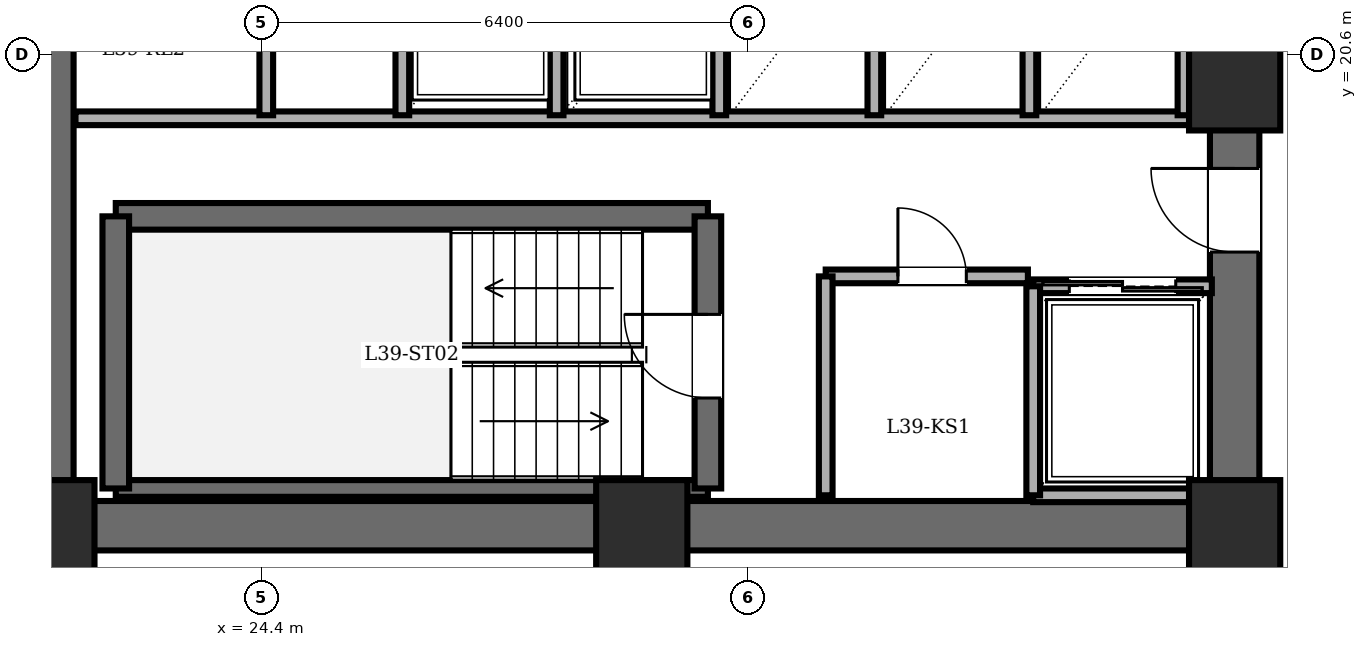
"""IFC4 building model, lengths in metres.
Left out: names, types, materials, properties, quantities, classifications, styles, units other than length and angle.
Written with IfcOpenShell. Run it as: python <this file> out.ifc"""

import sys

from ifc_helpers import new_model, si_unit, direction, frame, frame_2d, origin, origin_2d, place, context, subcontext, project, spatial, rectangle, extrude, element, fill, save


model = new_model("IFC4")
c1 = context("Model", 3, precision=1e-05, world=origin(), true_north=direction((0.0, 1.0)))
c2 = subcontext(c1, "Body", "Model", "MODEL_VIEW")
j1 = project(units=[si_unit("LENGTHUNIT", "METRE"), si_unit("PLANEANGLEUNIT", "RADIAN")], contexts=[c1])
p1 = place(None, origin())
s1 = spatial("IfcSite", under=j1, at=p1, CompositionType="ELEMENT")
p2 = place(p1, origin())
s2 = spatial("IfcBuilding", under=s1, at=p2, CompositionType="ELEMENT")
p3 = place(p2, frame((0.0, 0.0, 151.0)))
s3 = spatial("IfcBuildingStorey", under=s2, at=p3, CompositionType="ELEMENT", Elevation=151.0)
for number, where, z_axis, x_axis in (
    (1, (21.6, 14.4, 0.0), (0.0, 0.0, 1.0), (1.0, 0.0, 0.0)),
    (2, (29.4, 14.4, 0.0), (0.0, 0.0, 1.0), (1.0, 0.0, 0.0)),
    (3, (37.2, 14.4, 0.0), (0.0, 0.0, 1.0), (1.0, 0.0, 0.0)),
    (4, (37.2, 20.2, 0.0), (0.0, 0.0, 1.0), (1.0, 0.0, 0.0)),
):
    element("IfcColumn", number, at=place(p3, frame(where, z_axis=z_axis, x_axis=x_axis)), inside=s3, PredefinedType="COLUMN", context=c2, shape_type="SweptSolid", body=[
        extrude(rectangle(XDim=1.2, YDim=1.2, at=origin_2d()), origin(), (0.0, 0.0, 1.0), 3.6),
    ])
p4 = place(p3, frame((21.6, 14.4, 0.0), z_axis=(0.0, 0.0, 1.0), x_axis=(0.0, 1.0, 0.0)))
e5 = element("IfcWall", 5, at=p4, inside=s3, PredefinedType="SHEAR", context=c2, shape_type="SweptSolid", body=[
    extrude(rectangle(XDim=19.2, YDim=0.65, at=frame_2d((9.6, 0.0))), origin(), (0.0, 0.0, 1.0), 3.4),
])
p5 = place(p3, frame((37.2, 14.4, 0.0), z_axis=(0.0, 0.0, 1.0), x_axis=(-1.0, 0.0, 0.0)))
e6 = element("IfcWall", 6, at=p5, inside=s3, PredefinedType="SHEAR", context=c2, shape_type="SweptSolid", body=[
    extrude(rectangle(XDim=15.6, YDim=0.65, at=frame_2d((7.8, 0.0))), origin(), (0.0, 0.0, 1.0), 3.4),
])
p6 = place(p3, frame((37.2, 14.4, 0.0), z_axis=(0.0, 0.0, 1.0), x_axis=(0.0, 1.0, 0.0)))
e7 = element("IfcWall", 7, at=p6, inside=s3, PredefinedType="SHEAR", context=c2, shape_type="SweptSolid", body=[
    extrude(rectangle(XDim=19.2, YDim=0.65, at=frame_2d((9.6, 0.0))), origin(), (0.0, 0.0, 1.0), 3.4),
])
p7 = place(p6, frame((15.8, 0.0, 0.0)))
e8 = element("IfcOpeningElement", 8, at=p7, cuts=e7, PredefinedType="OPENING", context=c2, shape_type="SweptSolid", body=[
    extrude(rectangle(XDim=1.15, YDim=2.15, at=frame_2d((0.575, 1.075))), frame((0.0, 0.335, 0.0), z_axis=(0.0, -1.0, 0.0), x_axis=(1.0, 0.0, 0.0)), (0.0, 0.0, 1.0), 0.67),
])
p8 = place(p6, frame((3.6, 0.0, 0.0)))
e9 = element("IfcOpeningElement", 9, at=p8, cuts=e7, PredefinedType="OPENING", context=c2, shape_type="SweptSolid", body=[
    extrude(rectangle(XDim=1.1, YDim=2.15, at=frame_2d((0.55, 1.075))), frame((0.0, 0.335, 0.0), z_axis=(0.0, -1.0, 0.0), x_axis=(1.0, 0.0, 0.0)), (0.0, 0.0, 1.0), 0.67),
])
p9 = place(p6, frame((8.6, 0.0, 0.0)))
e10 = element("IfcOpeningElement", 10, at=p9, cuts=e7, PredefinedType="OPENING", context=c2, shape_type="SweptSolid", body=[
    extrude(rectangle(XDim=1.3, YDim=2.2, at=frame_2d((0.65, 1.1))), frame((0.0, 0.335, 0.0), z_axis=(0.0, -1.0, 0.0), x_axis=(1.0, 0.0, 0.0)), (0.0, 0.0, 1.0), 0.67),
])
p10 = place(p3, frame((22.48, 18.47, 0.0), z_axis=(0.0, 0.0, 1.0), x_axis=(1.0, 0.0, 0.0)))
e11 = element("IfcWall", 11, at=p10, inside=s3, PredefinedType="SOLIDWALL", context=c2, shape_type="SweptSolid", body=[
    extrude(rectangle(XDim=7.79, YDim=0.35, at=frame_2d((3.895, 0.0))), origin(), (0.0, 0.0, 1.0), 3.4),
])
p11 = place(p3, frame((22.48, 14.89, 0.0), z_axis=(0.0, 0.0, 1.0), x_axis=(1.0, 0.0, 0.0)))
e12 = element("IfcWall", 12, at=p11, inside=s3, PredefinedType="PARTITIONING", context=c2, shape_type="SweptSolid", body=[
    extrude(rectangle(XDim=7.79, YDim=0.22, at=frame_2d((3.895, 0.0))), origin(), (0.0, 0.0, 1.0), 3.4),
])
p12 = place(p3, frame((22.48, 14.89, 0.0), z_axis=(0.0, 0.0, 1.0), x_axis=(0.0, 1.0, 0.0)))
e13 = element("IfcWall", 13, at=p12, inside=s3, PredefinedType="SOLIDWALL", context=c2, shape_type="SweptSolid", body=[
    extrude(rectangle(XDim=3.58, YDim=0.35, at=frame_2d((1.79, 0.0))), origin(), (0.0, 0.0, 1.0), 3.4),
])
p13 = place(p3, frame((30.27, 14.89, 0.0), z_axis=(0.0, 0.0, 1.0), x_axis=(0.0, 1.0, 0.0)))
e14 = element("IfcWall", 14, at=p13, inside=s3, PredefinedType="SOLIDWALL", context=c2, shape_type="SweptSolid", body=[
    extrude(rectangle(XDim=3.58, YDim=0.35, at=frame_2d((1.79, 0.0))), origin(), (0.0, 0.0, 1.0), 3.4),
])
p14 = place(p13, frame((1.19, 0.0, 0.0)))
e15 = element("IfcOpeningElement", 15, at=p14, cuts=e14, PredefinedType="OPENING", context=c2, shape_type="SweptSolid", body=[
    extrude(rectangle(XDim=1.1, YDim=2.15, at=frame_2d((0.55, 1.075))), frame((0.0, 0.185, 0.0), z_axis=(0.0, -1.0, 0.0), x_axis=(1.0, 0.0, 0.0)), (0.0, 0.0, 1.0), 0.37),
])
p15 = place(p3, frame((21.95, 19.76, 0.0), z_axis=(0.0, 0.0, 1.0), x_axis=(1.0, 0.0, 0.0)))
e16 = element("IfcWall", 16, at=p15, inside=s3, PredefinedType="PARTITIONING", context=c2, shape_type="SweptSolid", body=[
    extrude(rectangle(XDim=14.87, YDim=0.18, at=frame_2d((7.435, 0.0))), origin(), (0.0, 0.0, 1.0), 3.4),
])
p16 = place(p3, frame((31.82, 17.68, 0.0), z_axis=(0.0, 0.0, 1.0), x_axis=(1.0, 0.0, 0.0)))
e17 = element("IfcWall", 17, at=p16, inside=s3, PredefinedType="PARTITIONING", context=c2, shape_type="SweptSolid", body=[
    extrude(rectangle(XDim=2.66, YDim=0.18, at=frame_2d((1.33, 0.0))), origin(), (0.0, 0.0, 1.0), 3.4),
])
p17 = place(p16, frame((0.95, 0.0, 0.0)))
e18 = element("IfcOpeningElement", 18, at=p17, cuts=e17, PredefinedType="OPENING", context=c2, shape_type="SweptSolid", body=[
    extrude(rectangle(XDim=0.9, YDim=2.05, at=frame_2d((0.45, 1.025))), frame((0.0, 0.1, 0.0), z_axis=(0.0, -1.0, 0.0), x_axis=(1.0, 0.0, 0.0)), (0.0, 0.0, 1.0), 0.2),
])
p18 = place(p3, frame((31.82, 14.8, 0.0), z_axis=(0.0, 0.0, 1.0), x_axis=(0.0, 1.0, 0.0)))
e19 = element("IfcWall", 19, at=p18, inside=s3, PredefinedType="PARTITIONING", context=c2, shape_type="SweptSolid", body=[
    extrude(rectangle(XDim=2.88, YDim=0.18, at=frame_2d((1.44, 0.0))), origin(), (0.0, 0.0, 1.0), 3.4),
])
p19 = place(p3, frame((34.55, 17.55, 0.0), z_axis=(0.0, 0.0, 1.0), x_axis=(1.0, 0.0, 0.0)))
e20 = element("IfcWall", 20, at=p19, inside=s3, PredefinedType="PARTITIONING", context=c2, shape_type="SweptSolid", body=[
    extrude(rectangle(XDim=2.35, YDim=0.18, at=frame_2d((1.175, 0.0))), origin(), (0.0, 0.0, 1.0), 3.4),
])
p20 = place(p19, frame((0.475, 0.0, 0.0)))
e21 = element("IfcOpeningElement", 21, at=p20, cuts=e20, PredefinedType="OPENING", context=c2, shape_type="SweptSolid", body=[
    extrude(rectangle(XDim=1.4, YDim=2.3, at=frame_2d((0.7, 1.15))), frame((0.0, 0.1, 0.0), z_axis=(0.0, -1.0, 0.0), x_axis=(1.0, 0.0, 0.0)), (0.0, 0.0, 1.0), 0.2),
])
p21 = place(p3, frame((36.9, 14.8, 0.0), z_axis=(0.0, 0.0, 1.0), x_axis=(-1.0, 0.0, 0.0)))
e22 = element("IfcWall", 22, at=p21, inside=s3, PredefinedType="PARTITIONING", context=c2, shape_type="SweptSolid", body=[
    extrude(rectangle(XDim=2.35, YDim=0.18, at=frame_2d((1.175, 0.0))), origin(), (0.0, 0.0, 1.0), 3.4),
])
p22 = place(p3, frame((34.55, 17.55, 0.0), z_axis=(0.0, 0.0, 1.0), x_axis=(0.0, -1.0, 0.0)))
e23 = element("IfcWall", 23, at=p22, inside=s3, PredefinedType="PARTITIONING", context=c2, shape_type="SweptSolid", body=[
    extrude(rectangle(XDim=2.75, YDim=0.18, at=frame_2d((1.375, 0.0))), origin(), (0.0, 0.0, 1.0), 3.4),
])
for number, where, z_axis, x_axis in (
    (24, (28.28, 19.8, 0.0), (0.0, 0.0, 1.0), (0.0, 1.0, 0.0)),
    (25, (30.42, 19.8, 0.0), (0.0, 0.0, 1.0), (0.0, 1.0, 0.0)),
    (26, (32.46, 19.8, 0.0), (0.0, 0.0, 1.0), (0.0, 1.0, 0.0)),
    (27, (34.5, 19.8, 0.0), (0.0, 0.0, 1.0), (0.0, 1.0, 0.0)),
    (28, (36.54, 19.8, 0.0), (0.0, 0.0, 1.0), (0.0, 1.0, 0.0)),
):
    element("IfcWall", number, at=place(p3, frame(where, z_axis=z_axis, x_axis=x_axis)), inside=s3, PredefinedType="PARTITIONING", context=c2, shape_type="SweptSolid", body=[
        extrude(rectangle(XDim=2.5, YDim=0.18, at=frame_2d((1.25, 0.0))), origin(), (0.0, 0.0, 1.0), 3.4),
    ])
p23 = place(p3, frame((24.46, 19.8, 0.0), z_axis=(0.0, 0.0, 1.0), x_axis=(0.0, 1.0, 0.0)))
e29 = element("IfcWall", 29, at=p23, inside=s3, PredefinedType="PARTITIONING", context=c2, shape_type="SweptSolid", body=[
    extrude(rectangle(XDim=3.85, YDim=0.18, at=frame_2d((1.925, 0.0))), origin(), (0.0, 0.0, 1.0), 3.4),
])
p24 = place(p23, frame((1.465, 0.0, 0.0)))
e30 = element("IfcOpeningElement", 30, at=p24, cuts=e29, PredefinedType="OPENING", context=c2, shape_type="SweptSolid", body=[
    extrude(rectangle(XDim=0.92, YDim=2.1, at=frame_2d((0.46, 1.05))), frame((0.0, 0.1, 0.0), z_axis=(0.0, -1.0, 0.0), x_axis=(1.0, 0.0, 0.0)), (0.0, 0.0, 1.0), 0.2),
])
p25 = place(p3, frame((26.25, 19.8, 0.0), z_axis=(0.0, 0.0, 1.0), x_axis=(0.0, 1.0, 0.0)))
e31 = element("IfcWall", 31, at=p25, inside=s3, PredefinedType="PARTITIONING", context=c2, shape_type="SweptSolid", body=[
    extrude(rectangle(XDim=2.55, YDim=0.18, at=frame_2d((1.275, 0.0))), origin(), (0.0, 0.0, 1.0), 3.4),
])
p26 = place(p14, origin())
e32 = element("IfcDoor", 32, at=p26, inside=s3, OperationType="SINGLE_SWING_RIGHT", PredefinedType="DOOR", context=c2, shape_type="SweptSolid", body=[
    extrude(rectangle(XDim=1.1, YDim=2.15, at=frame_2d((0.55, 1.075))), frame((0.0, 0.025, 0.0), z_axis=(0.0, -1.0, 0.0), x_axis=(1.0, 0.0, 0.0)), (0.0, 0.0, 1.0), 0.05),
])
fill(e15, e32)
p27 = place(p8, origin())
e33 = element("IfcDoor", 33, at=p27, inside=s3, OperationType="SINGLE_SWING_RIGHT", PredefinedType="DOOR", context=c2, shape_type="SweptSolid", body=[
    extrude(rectangle(XDim=1.1, YDim=2.15, at=frame_2d((0.55, 1.075))), frame((0.0, 0.025, 0.0), z_axis=(0.0, -1.0, 0.0), x_axis=(1.0, 0.0, 0.0)), (0.0, 0.0, 1.0), 0.05),
])
fill(e9, e33)
p28 = place(p17, origin())
e34 = element("IfcDoor", 34, at=p28, inside=s3, OperationType="SINGLE_SWING_LEFT", PredefinedType="DOOR", context=c2, shape_type="SweptSolid", body=[
    extrude(rectangle(XDim=0.9, YDim=2.05, at=frame_2d((0.45, 1.025))), frame((0.0, 0.025, 0.0), z_axis=(0.0, -1.0, 0.0), x_axis=(1.0, 0.0, 0.0)), (0.0, 0.0, 1.0), 0.05),
])
fill(e18, e34)
p29 = place(p20, origin())
e35 = element("IfcDoor", 35, at=p29, inside=s3, OperationType="DOUBLE_DOOR_SLIDING", PredefinedType="DOOR", context=c2, shape_type="SweptSolid", body=[
    extrude(rectangle(XDim=1.4, YDim=2.3, at=frame_2d((0.7, 1.15))), frame((0.0, 0.025, 0.0), z_axis=(0.0, -1.0, 0.0), x_axis=(1.0, 0.0, 0.0)), (0.0, 0.0, 1.0), 0.05),
])
fill(e21, e35)
save(model, sys.argv[1])
